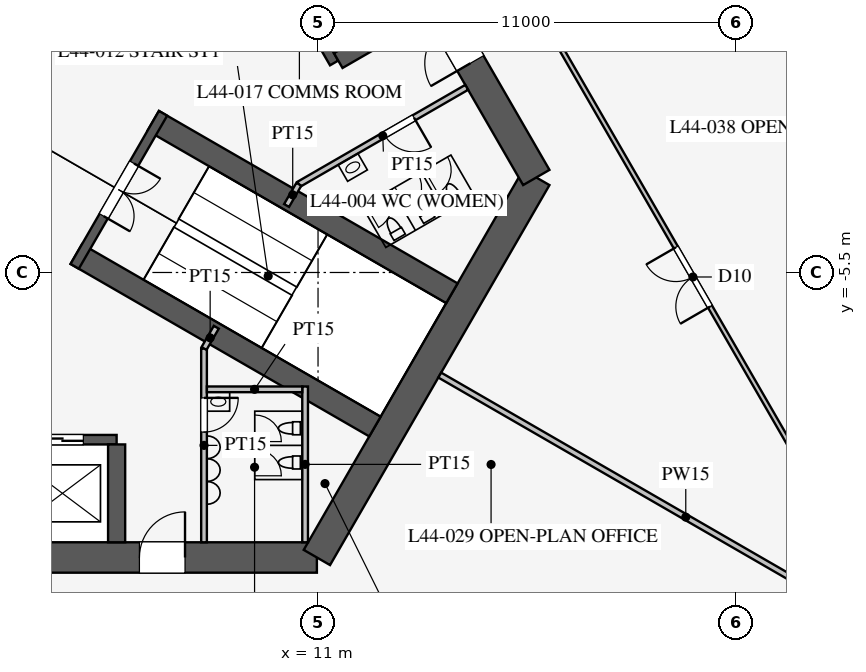
"""IFC4 building model, lengths in metres.
Left out: names, types, materials, properties, quantities, classifications, styles, units other than length and angle.
Written with IfcOpenShell. Run it as: python <this file> out.ifc"""

import sys

from ifc_helpers import new_model, si_unit, direction, frame, frame_2d, origin, place, context, subcontext, project, spatial, rectangle, extrude, element, fill, save


model = new_model("IFC4")
c1 = context("Model", 3, precision=1e-05, world=origin(), true_north=direction((0.0, 1.0)))
c2 = subcontext(c1, "Body", "Model", "MODEL_VIEW")
j1 = project(units=[si_unit("LENGTHUNIT", "METRE"), si_unit("PLANEANGLEUNIT", "RADIAN")], contexts=[c1])
p1 = place(None, origin())
s1 = spatial("IfcSite", under=j1, at=p1, CompositionType="ELEMENT")
p2 = place(p1, origin())
s2 = spatial("IfcBuilding", under=s1, at=p2, CompositionType="ELEMENT")
p3 = place(p2, frame((0.0, 0.0, 193.9)))
s3 = spatial("IfcBuildingStorey", under=s2, at=p3, CompositionType="ELEMENT", Elevation=193.9)
p4 = place(p3, frame((-10.97, -13.0, 0.0), z_axis=(0.0, 0.0, 1.0), x_axis=(1.0, 0.0, 0.0)))
e1 = element("IfcWall", 1, at=p4, inside=s3, PredefinedType="SHEAR", context=c2, shape_type="SweptSolid", body=[
    extrude(rectangle(XDim=21.939, YDim=0.8, at=frame_2d((10.97, 0.0))), origin(), (0.0, 0.0, 1.0), 4.2),
])
p5 = place(p4, frame((17.27, 0.0, 0.0)))
e2 = element("IfcOpeningElement", 2, at=p5, cuts=e1, PredefinedType="OPENING", context=c2, shape_type="SweptSolid", body=[
    extrude(rectangle(XDim=1.2, YDim=2.1, at=frame_2d((0.6, 1.05))), frame((0.0, 0.41, 0.0), z_axis=(0.0, -1.0, 0.0), x_axis=(1.0, 0.0, 0.0)), (0.0, 0.0, 1.0), 0.82),
])
p6 = place(p4, frame((3.47, 0.0, 0.0)))
e3 = element("IfcOpeningElement", 3, at=p6, cuts=e1, PredefinedType="OPENING", context=c2, shape_type="SweptSolid", body=[
    extrude(rectangle(XDim=1.2, YDim=2.1, at=frame_2d((0.6, 1.05))), frame((0.0, 0.41, 0.0), z_axis=(0.0, -1.0, 0.0), x_axis=(1.0, 0.0, 0.0)), (0.0, 0.0, 1.0), 0.82),
])
p7 = place(p3, frame((10.97, -13.0, 0.0), z_axis=(0.0, 0.0, 1.0), x_axis=(0.499995765644, 0.866027848477, 0.0)))
e4 = element("IfcWall", 4, at=p7, inside=s3, PredefinedType="SHEAR", context=c2, shape_type="SweptSolid", body=[
    extrude(rectangle(XDim=11.547, YDim=0.8, at=frame_2d((5.773, 0.0))), origin(), (0.0, 0.0, 1.0), 4.2),
])
p8 = place(p3, frame((16.743, -3.0, 0.0), z_axis=(0.0, 0.0, 1.0), x_axis=(-0.500002442456, 0.866023993627, 0.0)))
e5 = element("IfcWall", 5, at=p8, inside=s3, PredefinedType="SHEAR", context=c2, shape_type="SweptSolid", body=[
    extrude(rectangle(XDim=21.939, YDim=0.8, at=frame_2d((10.97, 0.0))), origin(), (0.0, 0.0, 1.0), 4.2),
])
p9 = place(p8, frame((17.27, 0.0, 0.0)))
e6 = element("IfcOpeningElement", 6, at=p9, cuts=e5, PredefinedType="OPENING", context=c2, shape_type="SweptSolid", body=[
    extrude(rectangle(XDim=1.2, YDim=2.1, at=frame_2d((0.6, 1.05))), frame((0.0, 0.41, 0.0), z_axis=(0.0, -1.0, 0.0), x_axis=(1.0, 0.0, 0.0)), (0.0, 0.0, 1.0), 0.82),
])
p10 = place(p8, frame((3.47, 0.0, 0.0)))
e7 = element("IfcOpeningElement", 7, at=p10, cuts=e5, PredefinedType="OPENING", context=c2, shape_type="SweptSolid", body=[
    extrude(rectangle(XDim=1.2, YDim=2.1, at=frame_2d((0.6, 1.05))), frame((0.0, 0.41, 0.0), z_axis=(0.0, -1.0, 0.0), x_axis=(1.0, 0.0, 0.0)), (0.0, 0.0, 1.0), 0.82),
])
p11 = place(p3, frame((-5.7, -9.9, 0.0), z_axis=(0.0, 0.0, 1.0), x_axis=(1.0, 0.0, 0.0)))
e8 = element("IfcWall", 8, at=p11, inside=s3, PredefinedType="SHEAR", context=c2, shape_type="SweptSolid", body=[
    extrude(rectangle(XDim=11.4, YDim=0.25, at=frame_2d((5.7, 0.0))), origin(), (0.0, 0.0, 1.0), 4.2),
])
p12 = place(p11, frame((0.875, 0.0, 0.0)))
e9 = element("IfcOpeningElement", 9, at=p12, cuts=e8, PredefinedType="OPENING", context=c2, shape_type="SweptSolid", body=[
    extrude(rectangle(XDim=1.1, YDim=2.2, at=frame_2d((0.55, 1.1))), frame((0.0, 0.135, 0.0), z_axis=(0.0, -1.0, 0.0), x_axis=(1.0, 0.0, 0.0)), (0.0, 0.0, 1.0), 0.27),
])
p13 = place(p11, frame((3.725, 0.0, 0.0)))
e10 = element("IfcOpeningElement", 10, at=p13, cuts=e8, PredefinedType="OPENING", context=c2, shape_type="SweptSolid", body=[
    extrude(rectangle(XDim=1.1, YDim=2.2, at=frame_2d((0.55, 1.1))), frame((0.0, 0.135, 0.0), z_axis=(0.0, -1.0, 0.0), x_axis=(1.0, 0.0, 0.0)), (0.0, 0.0, 1.0), 0.27),
])
p14 = place(p11, frame((6.575, 0.0, 0.0)))
e11 = element("IfcOpeningElement", 11, at=p14, cuts=e8, PredefinedType="OPENING", context=c2, shape_type="SweptSolid", body=[
    extrude(rectangle(XDim=1.1, YDim=2.2, at=frame_2d((0.55, 1.1))), frame((0.0, 0.135, 0.0), z_axis=(0.0, -1.0, 0.0), x_axis=(1.0, 0.0, 0.0)), (0.0, 0.0, 1.0), 0.27),
])
p15 = place(p11, frame((9.425, 0.0, 0.0)))
e12 = element("IfcOpeningElement", 12, at=p15, cuts=e8, PredefinedType="OPENING", context=c2, shape_type="SweptSolid", body=[
    extrude(rectangle(XDim=1.1, YDim=2.2, at=frame_2d((0.55, 1.1))), frame((0.0, 0.135, 0.0), z_axis=(0.0, -1.0, 0.0), x_axis=(1.0, 0.0, 0.0)), (0.0, 0.0, 1.0), 0.27),
])
p16 = place(p3, frame((5.7, -10.025, 0.0), z_axis=(0.0, 0.0, 1.0), x_axis=(0.0, -1.0, 0.0)))
e13 = element("IfcWall", 13, at=p16, inside=s3, PredefinedType="SHEAR", context=c2, shape_type="SweptSolid", body=[
    extrude(rectangle(XDim=2.575, YDim=0.45, at=frame_2d((1.288, 0.0))), origin(), (0.0, 0.0, 1.0), 4.2),
])
p17 = place(p3, frame((11.424, 0.014, 0.0), z_axis=(0.0, 0.0, 1.0), x_axis=(-0.500001763848, 0.866024385424, 0.0)))
e14 = element("IfcWall", 14, at=p17, inside=s3, PredefinedType="SHEAR", context=c2, shape_type="SweptSolid", body=[
    extrude(rectangle(XDim=11.4, YDim=0.25, at=frame_2d((5.7, 0.0))), origin(), (0.0, 0.0, 1.0), 4.2),
])
p18 = place(p17, frame((0.975, 0.0, 0.0)))
e15 = element("IfcOpeningElement", 15, at=p18, cuts=e14, PredefinedType="OPENING", context=c2, shape_type="SweptSolid", body=[
    extrude(rectangle(XDim=0.9, YDim=2.1, at=frame_2d((0.45, 1.05))), frame((0.0, 0.135, 0.0), z_axis=(0.0, -1.0, 0.0), x_axis=(1.0, 0.0, 0.0)), (0.0, 0.0, 1.0), 0.27),
])
p19 = place(p17, frame((3.825, 0.0, 0.0)))
e16 = element("IfcOpeningElement", 16, at=p19, cuts=e14, PredefinedType="OPENING", context=c2, shape_type="SweptSolid", body=[
    extrude(rectangle(XDim=0.9, YDim=2.1, at=frame_2d((0.45, 1.05))), frame((0.0, 0.135, 0.0), z_axis=(0.0, -1.0, 0.0), x_axis=(1.0, 0.0, 0.0)), (0.0, 0.0, 1.0), 0.27),
])
p20 = place(p17, frame((6.675, 0.0, 0.0)))
e17 = element("IfcOpeningElement", 17, at=p20, cuts=e14, PredefinedType="OPENING", context=c2, shape_type="SweptSolid", body=[
    extrude(rectangle(XDim=0.9, YDim=2.1, at=frame_2d((0.45, 1.05))), frame((0.0, 0.135, 0.0), z_axis=(0.0, -1.0, 0.0), x_axis=(1.0, 0.0, 0.0)), (0.0, 0.0, 1.0), 0.27),
])
p21 = place(p17, frame((9.525, 0.0, 0.0)))
e18 = element("IfcOpeningElement", 18, at=p21, cuts=e14, PredefinedType="OPENING", context=c2, shape_type="SweptSolid", body=[
    extrude(rectangle(XDim=0.9, YDim=2.1, at=frame_2d((0.45, 1.05))), frame((0.0, 0.135, 0.0), z_axis=(0.0, -1.0, 0.0), x_axis=(1.0, 0.0, 0.0)), (0.0, 0.0, 1.0), 0.27),
])
p22 = place(p3, frame((11.532, 0.076, 0.0), z_axis=(0.0, 0.0, 1.0), x_axis=(0.866005588531, 0.500034319456, 0.0)))
e19 = element("IfcWall", 19, at=p22, inside=s3, PredefinedType="SHEAR", context=c2, shape_type="SweptSolid", body=[
    extrude(rectangle(XDim=2.575, YDim=0.45, at=frame_2d((1.288, 0.0))), origin(), (0.0, 0.0, 1.0), 4.2),
])
for number, where, z_axis, x_axis in (
    (20, (4.638, -5.016, 0.0), (0.0, 0.0, 1.0), (0.866, -0.5, 0.0)),
    (21, (6.663, -1.509, 0.0), (0.0, 0.0, 1.0), (0.866, -0.5, 0.0)),
):
    element("IfcWall", number, at=place(p3, frame(where, z_axis=z_axis, x_axis=x_axis)), inside=s3, PredefinedType="SHEAR", context=c2, shape_type="SweptSolid", body=[
        extrude(rectangle(XDim=9.075, YDim=0.6, at=frame_2d((4.538, 0.0))), origin(), (0.0, 0.0, 1.0), 4.2),
    ])
p23 = place(p3, frame((4.597, -5.339, 0.0), z_axis=(0.0, 0.0, 1.0), x_axis=(0.499984536904, 0.866034331223, 0.0)))
e22 = element("IfcWall", 22, at=p23, inside=s3, PredefinedType="SHEAR", context=c2, shape_type="SweptSolid", body=[
    extrude(rectangle(XDim=4.65, YDim=0.25, at=frame_2d((2.325, 0.0))), origin(), (0.0, 0.0, 1.0), 4.2),
])
p24 = place(p23, frame((1.525, 0.0, 0.0)))
e23 = element("IfcOpeningElement", 23, at=p24, cuts=e22, PredefinedType="OPENING", context=c2, shape_type="SweptSolid", body=[
    extrude(rectangle(XDim=1.6, YDim=2.1, at=frame_2d((0.8, 1.05))), frame((0.0, 0.135, 0.0), z_axis=(0.0, -1.0, 0.0), x_axis=(1.0, 0.0, 0.0)), (0.0, 0.0, 1.0), 0.27),
])
p25 = place(p3, frame((8.0, -7.5, 0.0), z_axis=(0.0, 0.0, 1.0), x_axis=(0.0, -1.0, 0.0)))
e24 = element("IfcWall", 24, at=p25, inside=s3, PredefinedType="PARTITIONING", context=c2, shape_type="SweptSolid", body=[
    extrude(rectangle(XDim=5.1, YDim=0.15, at=frame_2d((2.55, 0.0))), origin(), (0.0, 0.0, 1.0), 4.0),
])
p26 = place(p25, frame((1.3, 0.0, 0.0)))
e25 = element("IfcOpeningElement", 25, at=p26, cuts=e24, PredefinedType="OPENING", context=c2, shape_type="SweptSolid", body=[
    extrude(rectangle(XDim=0.9, YDim=2.1, at=frame_2d((0.45, 1.05))), frame((0.0, 0.085, 0.0), z_axis=(0.0, -1.0, 0.0), x_axis=(1.0, 0.0, 0.0)), (0.0, 0.0, 1.0), 0.17),
])
p27 = place(p3, frame((10.495, -3.178, 0.0), z_axis=(0.0, 0.0, 1.0), x_axis=(0.86602216432, 0.500005610874, 0.0)))
e26 = element("IfcWall", 26, at=p27, inside=s3, PredefinedType="PARTITIONING", context=c2, shape_type="SweptSolid", body=[
    extrude(rectangle(XDim=5.1, YDim=0.15, at=frame_2d((2.55, 0.0))), origin(), (0.0, 0.0, 1.0), 4.0),
])
p28 = place(p27, frame((2.6, 0.0, 0.0)))
e27 = element("IfcOpeningElement", 27, at=p28, cuts=e26, PredefinedType="OPENING", context=c2, shape_type="SweptSolid", body=[
    extrude(rectangle(XDim=0.9, YDim=2.1, at=frame_2d((0.45, 1.05))), frame((0.0, 0.085, 0.0), z_axis=(0.0, -1.0, 0.0), x_axis=(1.0, 0.0, 0.0)), (0.0, 0.0, 1.0), 0.17),
])
for number, where, z_axis, x_axis in (
    (28, (8.0, -7.5, 0.0), (0.0, 0.0, 1.0), (0.5, 0.866, 0.0)),
    (29, (10.495, -3.178, 0.0), (0.0, 0.0, 1.0), (-0.5, -0.866, 0.0)),
):
    element("IfcWall", number, at=place(p3, frame(where, z_axis=z_axis, x_axis=x_axis)), inside=s3, PredefinedType="PARTITIONING", context=c2, shape_type="SweptSolid", body=[
        extrude(rectangle(XDim=0.645, YDim=0.15, at=frame_2d((0.323, 0.0))), origin(), (0.0, 0.0, 1.0), 4.0),
    ])
p29 = place(p3, frame((10.66, -8.5, 0.0), z_axis=(0.0, 0.0, 1.0), x_axis=(0.0, -1.0, 0.0)))
e30 = element("IfcWall", 30, at=p29, inside=s3, PredefinedType="PARTITIONING", context=c2, shape_type="SweptSolid", body=[
    extrude(rectangle(XDim=4.1, YDim=0.15, at=frame_2d((2.05, 0.0))), origin(), (0.0, 0.0, 1.0), 4.0),
])
p30 = place(p3, frame((8.075, -8.575, 0.0), z_axis=(0.0, 0.0, 1.0), x_axis=(1.0, 0.0, 0.0)))
e31 = element("IfcWall", 31, at=p30, inside=s3, PredefinedType="PARTITIONING", context=c2, shape_type="SweptSolid", body=[
    extrude(rectangle(XDim=2.51, YDim=0.15, at=frame_2d((1.255, 0.0))), origin(), (0.0, 0.0, 1.0), 4.0),
])
p31 = place(p3, frame((14.203, -8.2, 0.0), z_axis=(0.0, 0.0, 1.0), x_axis=(0.866021600284, -0.500006587798, 0.0)))
e32 = element("IfcWall", 32, at=p31, inside=s3, PredefinedType="PARTITIONING", context=c2, shape_type="SweptSolid", body=[
    extrude(rectangle(XDim=14.95, YDim=0.15, at=frame_2d((7.475, 0.0))), origin(), (0.0, 0.0, 1.0), 2.4),
])
p32 = place(p3, frame((26.415, -15.231, 0.0), z_axis=(0.0, 0.0, 1.0), x_axis=(-0.50000091641, 0.866024874695, 0.0)))
e33 = element("IfcWall", 33, at=p32, inside=s3, PredefinedType="PARTITIONING", context=c2, shape_type="SweptSolid", body=[
    extrude(rectangle(XDim=52.796, YDim=0.12, at=frame_2d((26.398, 0.0))), origin(), (0.0, 0.0, 1.0), 2.9),
])
p33 = place(p32, frame((10.2, 0.0, 0.15)))
e34 = element("IfcOpeningElement", 34, at=p33, cuts=e33, PredefinedType="OPENING", context=c2, shape_type="SweptSolid", body=[
    extrude(rectangle(XDim=1.8, YDim=2.1, at=frame_2d((0.9, 1.05))), frame((0.0, 0.07, 0.0), z_axis=(0.0, -1.0, 0.0), x_axis=(1.0, 0.0, 0.0)), (0.0, 0.0, 1.0), 0.14),
])
p34 = place(p32, frame((40.8, 0.0, 0.15)))
e35 = element("IfcOpeningElement", 35, at=p34, cuts=e33, PredefinedType="OPENING", context=c2, shape_type="SweptSolid", body=[
    extrude(rectangle(XDim=1.8, YDim=2.1, at=frame_2d((0.9, 1.05))), frame((0.0, 0.07, 0.0), z_axis=(0.0, -1.0, 0.0), x_axis=(1.0, 0.0, 0.0)), (0.0, 0.0, 1.0), 0.14),
])
p35 = place(p26, origin())
e36 = element("IfcDoor", 36, at=p35, inside=s3, OperationType="SINGLE_SWING_LEFT", PredefinedType="DOOR", context=c2, shape_type="SweptSolid", body=[
    extrude(rectangle(XDim=0.9, YDim=2.1, at=frame_2d((0.45, 1.05))), frame((0.0, 0.025, 0.0), z_axis=(0.0, -1.0, 0.0), x_axis=(1.0, 0.0, 0.0)), (0.0, 0.0, 1.0), 0.05),
])
fill(e25, e36)
p36 = place(p28, frame((0.9, 0.0, 0.0), z_axis=(0.0, 0.0, 1.0), x_axis=(-1.0, 0.0, 0.0)))
e37 = element("IfcDoor", 37, at=p36, inside=s3, OperationType="SINGLE_SWING_LEFT", PredefinedType="DOOR", context=c2, shape_type="SweptSolid", body=[
    extrude(rectangle(XDim=0.9, YDim=2.1, at=frame_2d((0.45, 1.05))), frame((0.0, 0.025, 0.0), z_axis=(0.0, -1.0, 0.0), x_axis=(1.0, 0.0, 0.0)), (0.0, 0.0, 1.0), 0.05),
])
fill(e27, e37)
p37 = place(p24, frame((1.6, 0.0, 0.0), z_axis=(0.0, 0.0, 1.0), x_axis=(-1.0, 0.0, 0.0)))
e38 = element("IfcDoor", 38, at=p37, inside=s3, OperationType="DOUBLE_DOOR_SINGLE_SWING", PredefinedType="DOOR", context=c2, shape_type="SweptSolid", body=[
    extrude(rectangle(XDim=1.6, YDim=2.1, at=frame_2d((0.8, 1.05))), frame((0.0, 0.025, 0.0), z_axis=(0.0, -1.0, 0.0), x_axis=(1.0, 0.0, 0.0)), (0.0, 0.0, 1.0), 0.05),
])
fill(e23, e38)
p38 = place(p5, origin())
e39 = element("IfcDoor", 39, at=p38, inside=s3, OperationType="SINGLE_SWING_RIGHT", PredefinedType="DOOR", context=c2, shape_type="SweptSolid", body=[
    extrude(rectangle(XDim=1.2, YDim=2.1, at=frame_2d((0.6, 1.05))), frame((0.0, 0.025, 0.0), z_axis=(0.0, -1.0, 0.0), x_axis=(1.0, 0.0, 0.0)), (0.0, 0.0, 1.0), 0.05),
])
fill(e2, e39)
p39 = place(p10, origin())
e40 = element("IfcDoor", 40, at=p39, inside=s3, OperationType="SINGLE_SWING_LEFT", PredefinedType="DOOR", context=c2, shape_type="SweptSolid", body=[
    extrude(rectangle(XDim=1.2, YDim=2.1, at=frame_2d((0.6, 1.05))), frame((0.0, 0.025, 0.0), z_axis=(0.0, -1.0, 0.0), x_axis=(1.0, 0.0, 0.0)), (0.0, 0.0, 1.0), 0.05),
])
fill(e7, e40)
p40 = place(p33, origin())
e41 = element("IfcDoor", 41, at=p40, inside=s3, OperationType="DOUBLE_DOOR_SINGLE_SWING", PredefinedType="DOOR", context=c2, shape_type="SweptSolid", body=[
    extrude(rectangle(XDim=1.8, YDim=2.1, at=frame_2d((0.9, 1.05))), frame((0.0, 0.025, 0.0), z_axis=(0.0, -1.0, 0.0), x_axis=(1.0, 0.0, 0.0)), (0.0, 0.0, 1.0), 0.05),
])
fill(e34, e41)
p41 = place(p15, origin())
e42 = element("IfcDoor", 42, at=p41, inside=s3, OperationType="DOUBLE_DOOR_SLIDING", PredefinedType="DOOR", context=c2, shape_type="SweptSolid", body=[
    extrude(rectangle(XDim=1.1, YDim=2.2, at=frame_2d((0.55, 1.1))), frame((0.0, 0.025, 0.0), z_axis=(0.0, -1.0, 0.0), x_axis=(1.0, 0.0, 0.0)), (0.0, 0.0, 1.0), 0.05),
])
fill(e12, e42)
save(model, sys.argv[1])
